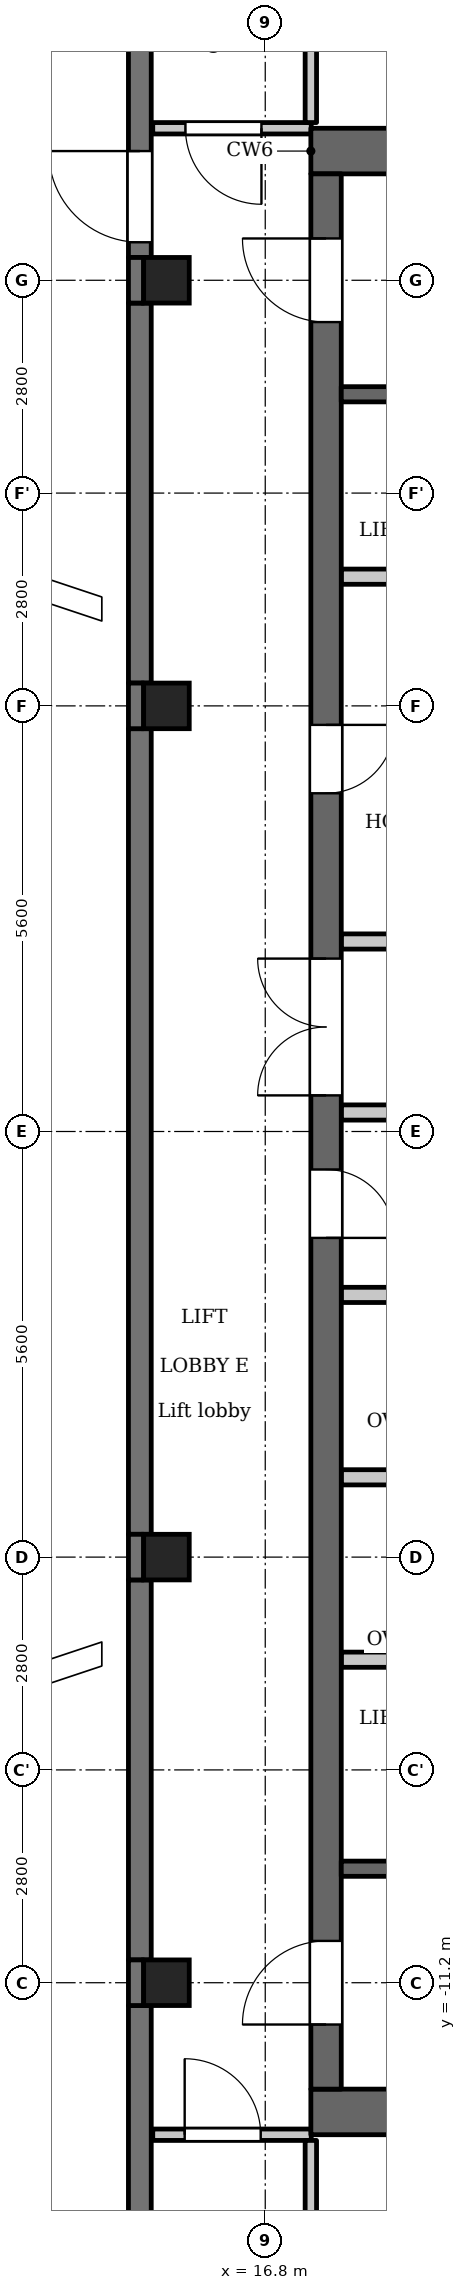
"""IFC4 building model, lengths in metres.
Left out: names, types, materials, properties, quantities, classifications, styles, units other than length and angle.
Written with IfcOpenShell. Run it as: python <this file> out.ifc"""

import sys

from ifc_helpers import new_model, si_unit, direction, frame, frame_2d, origin, origin_2d, place, context, subcontext, project, spatial, polyline, rectangle, outline, extrude, element, fill, save


model = new_model("IFC4")
c1 = context("Model", 3, precision=1e-05, world=origin(), true_north=direction((0.0, 1.0)))
c2 = subcontext(c1, "Body", "Model", "MODEL_VIEW")
j1 = project(units=[si_unit("LENGTHUNIT", "METRE"), si_unit("PLANEANGLEUNIT", "RADIAN")], contexts=[c1])
p1 = place(None, origin())
s1 = spatial("IfcSite", under=j1, at=p1, CompositionType="ELEMENT")
p2 = place(p1, origin())
s2 = spatial("IfcBuilding", under=s1, at=p2, CompositionType="ELEMENT")
p3 = place(p2, frame((0.0, 0.0, 299.9)))
s3 = spatial("IfcBuildingStorey", under=s2, at=p3, CompositionType="ELEMENT", Elevation=299.9)
for number, where, z_axis, x_axis in (
    (1, (15.5, -11.2, 0.0), (0.0, 0.0, 1.0), (1.0, 0.0, 0.0)),
    (2, (15.5, -5.6, 0.0), (0.0, 0.0, 1.0), (1.0, 0.0, 0.0)),
    (3, (15.5, 5.6, 0.0), (0.0, 0.0, 1.0), (1.0, 0.0, 0.0)),
    (4, (15.5, 11.2, 0.0), (0.0, 0.0, 1.0), (1.0, 0.0, 0.0)),
):
    element("IfcColumn", number, at=place(p3, frame(where, z_axis=z_axis, x_axis=x_axis)), inside=s3, PredefinedType="COLUMN", context=c2, shape_type="SweptSolid", body=[
        extrude(rectangle(XDim=0.6, YDim=0.6, at=origin_2d()), origin(), (0.0, 0.0, 1.0), 3.5),
    ])
p4 = place(p3, frame((15.15, 18.8, 0.0), z_axis=(0.0, 0.0, 1.0), x_axis=(0.0, -1.0, 0.0)))
e5 = element("IfcWall", 5, at=p4, inside=s3, PredefinedType="SOLIDWALL", context=c2, shape_type="SweptSolid", body=[
    extrude(rectangle(XDim=7.3, YDim=0.3, at=frame_2d((3.65, 0.0))), origin(), (0.0, 0.0, 1.0), 3.2),
])
p5 = place(p4, frame((5.9, 0.0, 0.0)))
e6 = element("IfcOpeningElement", 6, at=p5, cuts=e5, PredefinedType="OPENING", context=c2, shape_type="SweptSolid", body=[
    extrude(rectangle(XDim=1.2, YDim=2.1, at=frame_2d((0.6, 1.05))), frame((0.0, 0.16, 0.0), z_axis=(0.0, -1.0, 0.0), x_axis=(1.0, 0.0, 0.0)), (0.0, 0.0, 1.0), 0.32),
])
p6 = place(p4, frame((0.962, 0.0, 1.2)))
e7 = element("IfcOpeningElement", 7, at=p6, cuts=e5, PredefinedType="OPENING", context=c2, shape_type="SweptSolid", body=[
    extrude(rectangle(XDim=3.6, YDim=0.95, at=frame_2d((1.8, 0.475))), frame((0.0, 0.16, 0.0), z_axis=(0.0, -1.0, 0.0), x_axis=(1.0, 0.0, 0.0)), (0.0, 0.0, 1.0), 0.32),
])
p7 = place(p3, frame((15.15, 10.9, 0.0), z_axis=(0.0, 0.0, 1.0), x_axis=(0.0, -1.0, 0.0)))
e8 = element("IfcWall", 8, at=p7, inside=s3, PredefinedType="SOLIDWALL", context=c2, shape_type="SweptSolid", body=[
    extrude(rectangle(XDim=5.0, YDim=0.3, at=frame_2d((2.5, 0.0))), origin(), (0.0, 0.0, 1.0), 3.2),
])
p8 = place(p3, frame((15.15, 5.3, 0.0), z_axis=(0.0, 0.0, 1.0), x_axis=(0.0, -1.0, 0.0)))
e9 = element("IfcWall", 9, at=p8, inside=s3, PredefinedType="SOLIDWALL", context=c2, shape_type="SweptSolid", body=[
    extrude(rectangle(XDim=10.6, YDim=0.3, at=frame_2d((5.3, 0.0))), origin(), (0.0, 0.0, 1.0), 3.2),
])
p9 = place(p3, frame((15.15, -5.9, 0.0), z_axis=(0.0, 0.0, 1.0), x_axis=(0.0, -1.0, 0.0)))
e10 = element("IfcWall", 10, at=p9, inside=s3, PredefinedType="SOLIDWALL", context=c2, shape_type="SweptSolid", body=[
    extrude(rectangle(XDim=5.0, YDim=0.3, at=frame_2d((2.5, 0.0))), origin(), (0.0, 0.0, 1.0), 3.2),
])
p10 = place(p3, frame((15.15, -11.5, 0.0), z_axis=(0.0, 0.0, 1.0), x_axis=(0.0, -1.0, 0.0)))
e11 = element("IfcWall", 11, at=p10, inside=s3, PredefinedType="SOLIDWALL", context=c2, shape_type="SweptSolid", body=[
    extrude(rectangle(XDim=7.3, YDim=0.3, at=frame_2d((3.65, 0.0))), origin(), (0.0, 0.0, 1.0), 3.2),
])
p11 = place(p10, frame((2.738, 0.0, 1.2)))
e12 = element("IfcOpeningElement", 12, at=p11, cuts=e11, PredefinedType="OPENING", context=c2, shape_type="SweptSolid", body=[
    extrude(rectangle(XDim=3.6, YDim=0.95, at=frame_2d((1.8, 0.475))), frame((0.0, 0.16, 0.0), z_axis=(0.0, -1.0, 0.0), x_axis=(1.0, 0.0, 0.0)), (0.0, 0.0, 1.0), 0.32),
])
p12 = place(p3, origin())
e13 = element("IfcWall", 13, at=p12, inside=s3, PredefinedType="PARAPET", context=c2, shape_type="SweptSolid", body=[
    extrude(outline(polyline([(13.8, 7.0), (14.65, 6.717), (14.65, 7.033), (13.849, 7.3), (7.0, 7.3), (7.0, 7.0), (13.8, 7.0)])), origin(), (0.0, 0.0, 1.0), 1.1),
])
e14 = element("IfcWall", 14, at=p12, inside=s3, PredefinedType="PARAPET", context=c2, shape_type="SweptSolid", body=[
    extrude(outline(polyline([(-13.8, -7.0), (-14.65, -6.717), (-14.65, -7.033), (-13.849, -7.3), (13.849, -7.3), (14.65, -7.033), (14.65, -6.717), (13.8, -7.0), (-13.8, -7.0)])), origin(), (0.0, 0.0, 1.0), 1.1),
])
for number, where, z_axis, x_axis in (
    (15, (17.4, 12.9, 0.0), (0.0, 0.0, 1.0), (1.0, 0.0, 0.0)),
    (16, (17.4, -12.9, 0.0), (0.0, 0.0, 1.0), (1.0, 0.0, 0.0)),
):
    element("IfcWall", number, at=place(p3, frame(where, z_axis=z_axis, x_axis=x_axis)), inside=s3, PredefinedType="SHEAR", context=c2, shape_type="SweptSolid", body=[
        extrude(rectangle(XDim=7.6, YDim=0.6, at=frame_2d((3.8, 0.0))), origin(), (0.0, 0.0, 1.0), 3.2),
    ])
p13 = place(p3, frame((17.6, -12.6, 0.0), z_axis=(0.0, 0.0, 1.0), x_axis=(0.0, 1.0, 0.0)))
e17 = element("IfcWall", 17, at=p13, inside=s3, PredefinedType="SHEAR", context=c2, shape_type="SweptSolid", body=[
    extrude(rectangle(XDim=25.2, YDim=0.4, at=frame_2d((12.6, 0.0))), origin(), (0.0, 0.0, 1.0), 3.2),
])
p14 = place(p13, frame((11.2, 0.0, 0.0)))
e18 = element("IfcOpeningElement", 18, at=p14, cuts=e17, PredefinedType="OPENING", context=c2, shape_type="SweptSolid", body=[
    extrude(rectangle(XDim=0.9, YDim=2.1, at=frame_2d((0.45, 1.05))), frame((0.0, 0.21, 0.0), z_axis=(0.0, -1.0, 0.0), x_axis=(1.0, 0.0, 0.0)), (0.0, 0.0, 1.0), 0.42),
])
p15 = place(p13, frame((17.05, 0.0, 0.0)))
e19 = element("IfcOpeningElement", 19, at=p15, cuts=e17, PredefinedType="OPENING", context=c2, shape_type="SweptSolid", body=[
    extrude(rectangle(XDim=0.9, YDim=2.1, at=frame_2d((0.45, 1.05))), frame((0.0, 0.21, 0.0), z_axis=(0.0, -1.0, 0.0), x_axis=(1.0, 0.0, 0.0)), (0.0, 0.0, 1.0), 0.42),
])
p16 = place(p13, frame((23.25, 0.0, 0.0)))
e20 = element("IfcOpeningElement", 20, at=p16, cuts=e17, PredefinedType="OPENING", context=c2, shape_type="SweptSolid", body=[
    extrude(rectangle(XDim=1.1, YDim=2.1, at=frame_2d((0.55, 1.05))), frame((0.0, 0.21, 0.0), z_axis=(0.0, -1.0, 0.0), x_axis=(1.0, 0.0, 0.0)), (0.0, 0.0, 1.0), 0.42),
])
p17 = place(p13, frame((0.85, 0.0, 0.0)))
e21 = element("IfcOpeningElement", 21, at=p17, cuts=e17, PredefinedType="OPENING", context=c2, shape_type="SweptSolid", body=[
    extrude(rectangle(XDim=1.1, YDim=2.1, at=frame_2d((0.55, 1.05))), frame((0.0, 0.21, 0.0), z_axis=(0.0, -1.0, 0.0), x_axis=(1.0, 0.0, 0.0)), (0.0, 0.0, 1.0), 0.42),
])
p18 = place(p13, frame((13.075, 0.0, 0.0)))
e22 = element("IfcOpeningElement", 22, at=p18, cuts=e17, PredefinedType="OPENING", context=c2, shape_type="SweptSolid", body=[
    extrude(rectangle(XDim=1.8, YDim=2.1, at=frame_2d((0.9, 1.05))), frame((0.0, 0.21, 0.0), z_axis=(0.0, -1.0, 0.0), x_axis=(1.0, 0.0, 0.0)), (0.0, 0.0, 1.0), 0.42),
])
p19 = place(p3, frame((17.8, -9.7, 0.0), z_axis=(0.0, 0.0, 1.0), x_axis=(1.0, 0.0, 0.0)))
e23 = element("IfcWall", 23, at=p19, inside=s3, PredefinedType="SHEAR", context=c2, shape_type="SweptSolid", body=[
    extrude(rectangle(XDim=5.8, YDim=0.2, at=frame_2d((2.9, 0.0))), origin(), (0.0, 0.0, 1.0), 3.2),
])
p20 = place(p19, frame((0.85, 0.0, 0.0)))
e24 = element("IfcOpeningElement", 24, at=p20, cuts=e23, PredefinedType="OPENING", context=c2, shape_type="SweptSolid", body=[
    extrude(rectangle(XDim=1.1, YDim=2.1, at=frame_2d((0.55, 1.05))), frame((0.0, 0.11, 0.0), z_axis=(0.0, -1.0, 0.0), x_axis=(1.0, 0.0, 0.0)), (0.0, 0.0, 1.0), 0.22),
])
p21 = place(p19, frame((3.75, 0.0, 0.0)))
e25 = element("IfcOpeningElement", 25, at=p21, cuts=e23, PredefinedType="OPENING", context=c2, shape_type="SweptSolid", body=[
    extrude(rectangle(XDim=1.1, YDim=2.1, at=frame_2d((0.55, 1.05))), frame((0.0, 0.11, 0.0), z_axis=(0.0, -1.0, 0.0), x_axis=(1.0, 0.0, 0.0)), (0.0, 0.0, 1.0), 0.22),
])
for number, where, z_axis, x_axis in (
    (26, (17.8, -6.95, 0.0), (0.0, 0.0, 1.0), (1.0, 0.0, 0.0)),
    (27, (17.8, -4.55, 0.0), (0.0, 0.0, 1.0), (1.0, 0.0, 0.0)),
    (28, (17.8, -2.15, 0.0), (0.0, 0.0, 1.0), (1.0, 0.0, 0.0)),
):
    element("IfcWall", number, at=place(p3, frame(where, z_axis=z_axis, x_axis=x_axis)), inside=s3, PredefinedType="PARTITIONING", context=c2, shape_type="SweptSolid", body=[
        extrude(rectangle(XDim=2.8, YDim=0.2, at=frame_2d((1.4, 0.0))), origin(), (0.0, 0.0, 1.0), 3.2),
    ])
for number, where, z_axis, x_axis in (
    (29, (17.8, 0.25, 0.0), (0.0, 0.0, 1.0), (1.0, 0.0, 0.0)),
    (30, (17.8, 2.5, 0.0), (0.0, 0.0, 1.0), (1.0, 0.0, 0.0)),
):
    element("IfcWall", number, at=place(p3, frame(where, z_axis=z_axis, x_axis=x_axis)), inside=s3, PredefinedType="PARTITIONING", context=c2, shape_type="SweptSolid", body=[
        extrude(rectangle(XDim=3.0, YDim=0.2, at=frame_2d((1.5, 0.0))), origin(), (0.0, 0.0, 1.0), 3.2),
    ])
p22 = place(p3, frame((17.8, 7.3, 0.0), z_axis=(0.0, 0.0, 1.0), x_axis=(1.0, 0.0, 0.0)))
e31 = element("IfcWall", 31, at=p22, inside=s3, PredefinedType="PARTITIONING", context=c2, shape_type="SweptSolid", body=[
    extrude(rectangle(XDim=2.8, YDim=0.2, at=frame_2d((1.4, 0.0))), origin(), (0.0, 0.0, 1.0), 3.2),
])
p23 = place(p3, frame((17.8, 9.7, 0.0), z_axis=(0.0, 0.0, 1.0), x_axis=(1.0, 0.0, 0.0)))
e32 = element("IfcWall", 32, at=p23, inside=s3, PredefinedType="SHEAR", context=c2, shape_type="SweptSolid", body=[
    extrude(rectangle(XDim=5.8, YDim=0.2, at=frame_2d((2.9, 0.0))), origin(), (0.0, 0.0, 1.0), 3.2),
])
p24 = place(p23, frame((0.85, 0.0, 0.0)))
e33 = element("IfcOpeningElement", 33, at=p24, cuts=e32, PredefinedType="OPENING", context=c2, shape_type="SweptSolid", body=[
    extrude(rectangle(XDim=1.1, YDim=2.1, at=frame_2d((0.55, 1.05))), frame((0.0, 0.11, 0.0), z_axis=(0.0, -1.0, 0.0), x_axis=(1.0, 0.0, 0.0)), (0.0, 0.0, 1.0), 0.22),
])
p25 = place(p23, frame((3.75, 0.0, 0.0)))
e34 = element("IfcOpeningElement", 34, at=p25, cuts=e32, PredefinedType="OPENING", context=c2, shape_type="SweptSolid", body=[
    extrude(rectangle(XDim=1.1, YDim=2.1, at=frame_2d((0.55, 1.05))), frame((0.0, 0.11, 0.0), z_axis=(0.0, -1.0, 0.0), x_axis=(1.0, 0.0, 0.0)), (0.0, 0.0, 1.0), 0.22),
])
p26 = place(p3, frame((15.32, -13.2, 0.0), z_axis=(0.0, 0.0, 1.0), x_axis=(1.0, 0.0, 0.0)))
e35 = element("IfcWall", 35, at=p26, inside=s3, PredefinedType="PARTITIONING", context=c2, shape_type="SweptSolid", body=[
    extrude(rectangle(XDim=2.085, YDim=0.15, at=frame_2d((1.042, 0.0))), origin(), (0.0, 0.0, 1.0), 3.2),
])
p27 = place(p26, frame((0.42, 0.0, 0.0)))
e36 = element("IfcOpeningElement", 36, at=p27, cuts=e35, PredefinedType="OPENING", context=c2, shape_type="SweptSolid", body=[
    extrude(rectangle(XDim=1.0, YDim=2.1, at=frame_2d((0.5, 1.05))), frame((0.0, 0.085, 0.0), z_axis=(0.0, -1.0, 0.0), x_axis=(1.0, 0.0, 0.0)), (0.0, 0.0, 1.0), 0.17),
])
p28 = place(p3, frame((15.32, 13.2, 0.0), z_axis=(0.0, 0.0, 1.0), x_axis=(1.0, 0.0, 0.0)))
e37 = element("IfcWall", 37, at=p28, inside=s3, PredefinedType="PARTITIONING", context=c2, shape_type="SweptSolid", body=[
    extrude(rectangle(XDim=2.085, YDim=0.15, at=frame_2d((1.042, 0.0))), origin(), (0.0, 0.0, 1.0), 3.2),
])
p29 = place(p28, frame((0.43, 0.0, 0.0)))
e38 = element("IfcOpeningElement", 38, at=p29, cuts=e37, PredefinedType="OPENING", context=c2, shape_type="SweptSolid", body=[
    extrude(rectangle(XDim=1.0, YDim=2.1, at=frame_2d((0.5, 1.05))), frame((0.0, 0.085, 0.0), z_axis=(0.0, -1.0, 0.0), x_axis=(1.0, 0.0, 0.0)), (0.0, 0.0, 1.0), 0.17),
])
p30 = place(p3, frame((17.4, -19.236, 0.0), z_axis=(0.0, 0.0, 1.0), x_axis=(0.0, 1.0, 0.0)))
e39 = element("IfcWall", 39, at=p30, inside=s3, PredefinedType="PARTITIONING", context=c2, shape_type="SweptSolid", body=[
    extrude(rectangle(XDim=5.961, YDim=0.15, at=frame_2d((2.981, 0.0))), origin(), (0.0, 0.0, 1.0), 3.2),
])
p31 = place(p30, frame((3.917, 0.0, 0.0)))
e40 = element("IfcOpeningElement", 40, at=p31, cuts=e39, PredefinedType="OPENING", context=c2, shape_type="SweptSolid", body=[
    extrude(rectangle(XDim=0.9, YDim=2.1, at=frame_2d((0.45, 1.05))), frame((0.0, 0.085, 0.0), z_axis=(0.0, -1.0, 0.0), x_axis=(1.0, 0.0, 0.0)), (0.0, 0.0, 1.0), 0.17),
])
p32 = place(p3, frame((17.4, 13.275, 0.0), z_axis=(0.0, 0.0, 1.0), x_axis=(0.0, 1.0, 0.0)))
e41 = element("IfcWall", 41, at=p32, inside=s3, PredefinedType="PARTITIONING", context=c2, shape_type="SweptSolid", body=[
    extrude(rectangle(XDim=5.961, YDim=0.15, at=frame_2d((2.981, 0.0))), origin(), (0.0, 0.0, 1.0), 3.2),
])
p33 = place(p32, frame((4.575, 0.0, 0.0)))
e42 = element("IfcOpeningElement", 42, at=p33, cuts=e41, PredefinedType="OPENING", context=c2, shape_type="SweptSolid", body=[
    extrude(rectangle(XDim=1.0, YDim=2.1, at=frame_2d((0.5, 1.05))), frame((0.0, 0.085, 0.0), z_axis=(0.0, -1.0, 0.0), x_axis=(1.0, 0.0, 0.0)), (0.0, 0.0, 1.0), 0.17),
])
e43 = element("IfcWall", 43, at=p12, inside=s3, PredefinedType="SOLIDWALL", context=c2, shape_type="SweptSolid", body=[
    extrude(outline(polyline([(15.2, -10.9), (15.0, -10.9), (15.0, -11.5), (15.2, -11.5), (15.2, -10.9)])), origin(), (0.0, 0.0, 1.0), 3.2),
])
e44 = element("IfcWall", 44, at=p12, inside=s3, PredefinedType="SOLIDWALL", context=c2, shape_type="SweptSolid", body=[
    extrude(outline(polyline([(15.2, -5.3), (15.0, -5.3), (15.0, -5.9), (15.3, -5.9), (15.2, -5.9), (15.2, -5.3)])), origin(), (0.0, 0.0, 1.0), 3.2),
])
e45 = element("IfcWall", 45, at=p12, inside=s3, PredefinedType="SOLIDWALL", context=c2, shape_type="SweptSolid", body=[
    extrude(outline(polyline([(15.3, 5.9), (15.0, 5.9), (15.0, 5.3), (15.3, 5.3), (15.2, 5.3), (15.2, 5.9), (15.3, 5.9)])), origin(), (0.0, 0.0, 1.0), 3.2),
])
e46 = element("IfcWall", 46, at=p12, inside=s3, PredefinedType="SOLIDWALL", context=c2, shape_type="SweptSolid", body=[
    extrude(outline(polyline([(15.2, 11.5), (15.0, 11.5), (15.0, 10.9), (15.2, 10.9), (15.2, 11.5)])), origin(), (0.0, 0.0, 1.0), 3.2),
])
p34 = place(p14, origin())
e47 = element("IfcDoor", 47, at=p34, inside=s3, OperationType="SINGLE_SWING_LEFT", PredefinedType="DOOR", context=c2, shape_type="SweptSolid", body=[
    extrude(rectangle(XDim=0.9, YDim=2.1, at=frame_2d((0.45, 1.05))), frame((0.0, 0.025, 0.0), z_axis=(0.0, -1.0, 0.0), x_axis=(1.0, 0.0, 0.0)), (0.0, 0.0, 1.0), 0.05),
])
fill(e18, e47)
p35 = place(p15, origin())
e48 = element("IfcDoor", 48, at=p35, inside=s3, OperationType="SINGLE_SWING_RIGHT", PredefinedType="DOOR", context=c2, shape_type="SweptSolid", body=[
    extrude(rectangle(XDim=0.9, YDim=2.1, at=frame_2d((0.45, 1.05))), frame((0.0, 0.025, 0.0), z_axis=(0.0, -1.0, 0.0), x_axis=(1.0, 0.0, 0.0)), (0.0, 0.0, 1.0), 0.05),
])
fill(e19, e48)
p36 = place(p16, origin())
e49 = element("IfcDoor", 49, at=p36, inside=s3, OperationType="SINGLE_SWING_LEFT", PredefinedType="DOOR", context=c2, shape_type="SweptSolid", body=[
    extrude(rectangle(XDim=1.1, YDim=2.1, at=frame_2d((0.55, 1.05))), frame((0.0, 0.025, 0.0), z_axis=(0.0, -1.0, 0.0), x_axis=(1.0, 0.0, 0.0)), (0.0, 0.0, 1.0), 0.05),
])
fill(e20, e49)
p37 = place(p17, origin())
e50 = element("IfcDoor", 50, at=p37, inside=s3, OperationType="SINGLE_SWING_RIGHT", PredefinedType="DOOR", context=c2, shape_type="SweptSolid", body=[
    extrude(rectangle(XDim=1.1, YDim=2.1, at=frame_2d((0.55, 1.05))), frame((0.0, 0.025, 0.0), z_axis=(0.0, -1.0, 0.0), x_axis=(1.0, 0.0, 0.0)), (0.0, 0.0, 1.0), 0.05),
])
fill(e21, e50)
p38 = place(p18, origin())
e51 = element("IfcDoor", 51, at=p38, inside=s3, OperationType="DOUBLE_DOOR_SINGLE_SWING", PredefinedType="DOOR", context=c2, shape_type="SweptSolid", body=[
    extrude(rectangle(XDim=1.8, YDim=2.1, at=frame_2d((0.9, 1.05))), frame((0.0, 0.025, 0.0), z_axis=(0.0, -1.0, 0.0), x_axis=(1.0, 0.0, 0.0)), (0.0, 0.0, 1.0), 0.05),
])
fill(e22, e51)
p39 = place(p29, origin())
e52 = element("IfcDoor", 52, at=p39, inside=s3, OperationType="SINGLE_SWING_RIGHT", PredefinedType="DOOR", context=c2, shape_type="SweptSolid", body=[
    extrude(rectangle(XDim=1.0, YDim=2.1, at=frame_2d((0.5, 1.05))), frame((0.0, 0.025, 0.0), z_axis=(0.0, -1.0, 0.0), x_axis=(1.0, 0.0, 0.0)), (0.0, 0.0, 1.0), 0.05),
])
fill(e38, e52)
p40 = place(p27, origin())
e53 = element("IfcDoor", 53, at=p40, inside=s3, OperationType="SINGLE_SWING_RIGHT", PredefinedType="DOOR", context=c2, shape_type="SweptSolid", body=[
    extrude(rectangle(XDim=1.0, YDim=2.1, at=frame_2d((0.5, 1.05))), frame((0.0, 0.025, 0.0), z_axis=(0.0, -1.0, 0.0), x_axis=(1.0, 0.0, 0.0)), (0.0, 0.0, 1.0), 0.05),
])
fill(e36, e53)
p41 = place(p5, origin())
e54 = element("IfcDoor", 54, at=p41, inside=s3, OperationType="SINGLE_SWING_LEFT", PredefinedType="DOOR", context=c2, shape_type="SweptSolid", body=[
    extrude(rectangle(XDim=1.2, YDim=2.1, at=frame_2d((0.6, 1.05))), frame((0.0, 0.025, 0.0), z_axis=(0.0, -1.0, 0.0), x_axis=(1.0, 0.0, 0.0)), (0.0, 0.0, 1.0), 0.05),
])
fill(e6, e54)
save(model, sys.argv[1])
